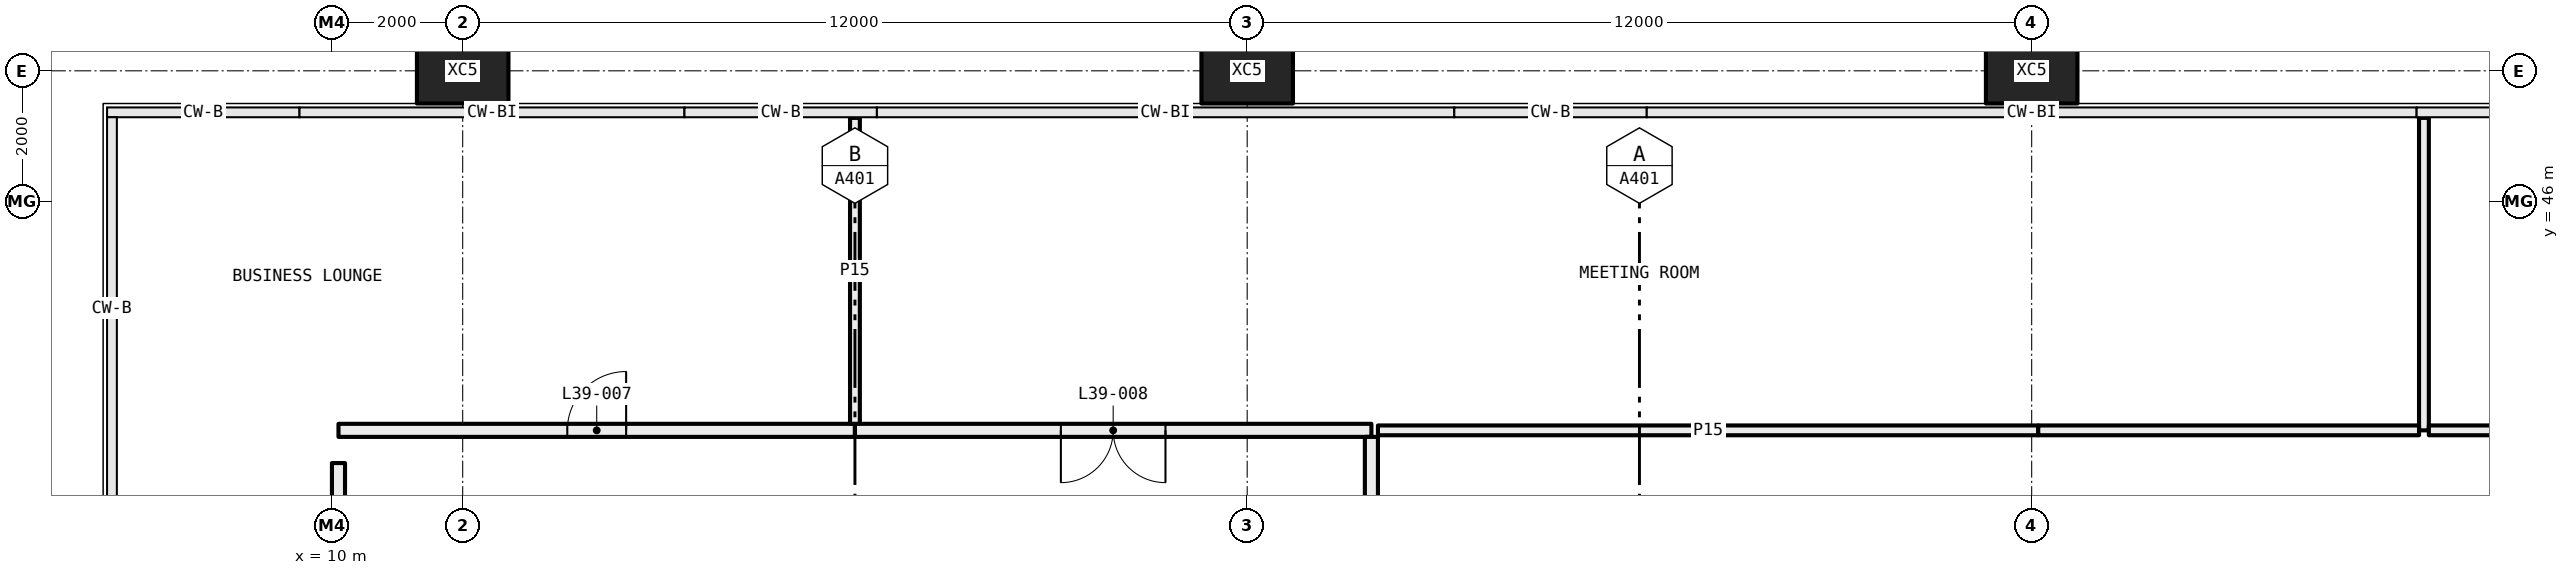
"""IFC4 building model, lengths in metres.
Left out: names, types, materials, properties, quantities, classifications, styles, units other than length and angle.
Written with IfcOpenShell. Run it as: python <this file> out.ifc"""

import sys

from ifc_helpers import new_model, si_unit, direction, frame, frame_2d, origin, origin_2d, place, context, subcontext, project, spatial, rectangle, hollow_rectangle, extrude, element, fill, save


model = new_model("IFC4")
c1 = context("Model", 3, precision=1e-05, world=origin(), true_north=direction((0.0, 1.0)))
c2 = subcontext(c1, "Body", "Model", "MODEL_VIEW")
j1 = project(units=[si_unit("LENGTHUNIT", "METRE"), si_unit("PLANEANGLEUNIT", "RADIAN")], contexts=[c1])
p1 = place(None, origin())
s1 = spatial("IfcSite", under=j1, at=p1, CompositionType="ELEMENT")
p2 = place(p1, origin())
s2 = spatial("IfcBuilding", under=s1, at=p2, CompositionType="ELEMENT")
p3 = place(p2, frame((0.0, 0.0, 148.35)))
s3 = spatial("IfcBuildingStorey", under=s2, at=p3, CompositionType="ELEMENT", Elevation=148.35)
for number, where, z_axis, x_axis in (
    (1, (12.0, 48.0, -0.4), (0.0, 0.0, 1.0), (1.0, 0.0, 0.0)),
    (2, (24.0, 48.0, -0.4), (0.0, 0.0, 1.0), (1.0, 0.0, 0.0)),
    (3, (36.0, 48.0, -0.4), (0.0, 0.0, 1.0), (1.0, 0.0, 0.0)),
):
    element("IfcColumn", number, at=place(p3, frame(where, z_axis=z_axis, x_axis=x_axis)), inside=s3, PredefinedType="COLUMN", context=c2, shape_type="SweptSolid", body=[
        extrude(hollow_rectangle(XDim=1.4, YDim=1.0, WallThickness=0.055, at=origin_2d()), origin(), (0.0, 0.0, 1.0), 5.4),
    ])
p4 = place(p3, frame((18.0, 42.5, 0.0), z_axis=(0.0, 0.0, 1.0), x_axis=(-1.0, 0.0, 0.0)))
e4 = element("IfcWall", 4, at=p4, inside=s3, PredefinedType="PARTITIONING", context=c2, shape_type="SweptSolid", body=[
    extrude(rectangle(XDim=7.9, YDim=0.2, at=frame_2d((3.95, 0.0))), origin(), (0.0, 0.0, 1.0), 5.0),
])
p5 = place(p4, frame((3.5, 0.0, 0.0)))
e5 = element("IfcOpeningElement", 5, at=p5, cuts=e4, PredefinedType="OPENING", context=c2, shape_type="SweptSolid", body=[
    extrude(rectangle(XDim=0.9, YDim=2.1, at=frame_2d((0.45, 1.05))), frame((0.0, 0.11, 0.0), z_axis=(0.0, -1.0, 0.0), x_axis=(1.0, 0.0, 0.0)), (0.0, 0.0, 1.0), 0.22),
])
p6 = place(p3, frame((25.9, 42.5, 0.0), z_axis=(0.0, 0.0, 1.0), x_axis=(-1.0, 0.0, 0.0)))
e6 = element("IfcWall", 6, at=p6, inside=s3, PredefinedType="PARTITIONING", context=c2, shape_type="SweptSolid", body=[
    extrude(rectangle(XDim=7.9, YDim=0.2, at=frame_2d((3.95, 0.0))), origin(), (0.0, 0.0, 1.0), 5.0),
])
p7 = place(p6, frame((3.15, 0.0, 0.0)))
e7 = element("IfcOpeningElement", 7, at=p7, cuts=e6, PredefinedType="OPENING", context=c2, shape_type="SweptSolid", body=[
    extrude(rectangle(XDim=1.6, YDim=2.1, at=frame_2d((0.8, 1.05))), frame((0.0, 0.11, 0.0), z_axis=(0.0, -1.0, 0.0), x_axis=(1.0, 0.0, 0.0)), (0.0, 0.0, 1.0), 0.22),
])
p8 = place(p3, frame((10.1, 42.0, 0.0), z_axis=(0.0, 0.0, 1.0), x_axis=(0.0, -1.0, 0.0)))
e8 = element("IfcWall", 8, at=p8, inside=s3, PredefinedType="PARTITIONING", context=c2, shape_type="SweptSolid", body=[
    extrude(rectangle(XDim=18.1, YDim=0.2, at=frame_2d((9.05, 0.0))), origin(), (0.0, 0.0, 1.0), 4.4),
])
p9 = place(p8, frame((8.25, 0.0, 0.0)))
e9 = element("IfcOpeningElement", 9, at=p9, cuts=e8, PredefinedType="OPENING", context=c2, shape_type="SweptSolid", body=[
    extrude(rectangle(XDim=1.6, YDim=2.1, at=frame_2d((0.8, 1.05))), frame((0.0, 0.11, 0.0), z_axis=(0.0, -1.0, 0.0), x_axis=(1.0, 0.0, 0.0)), (0.0, 0.0, 1.0), 0.22),
])
p10 = place(p3, frame((25.9, 36.1, 0.0), z_axis=(0.0, 0.0, 1.0), x_axis=(0.0, 1.0, 0.0)))
e10 = element("IfcWall", 10, at=p10, inside=s3, PredefinedType="PARTITIONING", context=c2, shape_type="SweptSolid", body=[
    extrude(rectangle(XDim=6.3, YDim=0.2, at=frame_2d((3.15, 0.0))), origin(), (0.0, 0.0, 1.0), 5.0),
])
p11 = place(p3, frame((18.0, 42.6, 0.0), z_axis=(0.0, 0.0, 1.0), x_axis=(0.0, 1.0, 0.0)))
e11 = element("IfcWall", 11, at=p11, inside=s3, PredefinedType="PARTITIONING", context=c2, shape_type="SweptSolid", body=[
    extrude(rectangle(XDim=4.68, YDim=0.15, at=frame_2d((2.34, 0.0))), origin(), (0.0, 0.0, 1.0), 5.0),
])
p12 = place(p3, frame((42.0, 42.5, 0.0), z_axis=(0.0, 0.0, 1.0), x_axis=(0.0, 1.0, 0.0)))
e12 = element("IfcWall", 12, at=p12, inside=s3, PredefinedType="PARTITIONING", context=c2, shape_type="SweptSolid", body=[
    extrude(rectangle(XDim=4.78, YDim=0.15, at=frame_2d((2.39, 0.0))), origin(), (0.0, 0.0, 1.0), 5.0),
])
p13 = place(p3, frame((26.0, 42.5, 0.0), z_axis=(0.0, 0.0, 1.0), x_axis=(1.0, 0.0, 0.0)))
e13 = element("IfcWall", 13, at=p13, inside=s3, PredefinedType="PARTITIONING", context=c2, shape_type="SweptSolid", body=[
    extrude(rectangle(XDim=10.1, YDim=0.15, at=frame_2d((5.05, 0.0))), origin(), (0.0, 0.0, 1.0), 4.4),
])
p14 = place(p3, frame((36.1, 42.5, 0.0), z_axis=(0.0, 0.0, 1.0), x_axis=(1.0, 0.0, 0.0)))
e14 = element("IfcWall", 14, at=p14, inside=s3, PredefinedType="PARTITIONING", context=c2, shape_type="SweptSolid", body=[
    extrude(rectangle(XDim=5.825, YDim=0.15, at=frame_2d((2.913, 0.0))), origin(), (0.0, 0.0, 1.0), 5.0),
])
p15 = place(p3, frame((42.075, 42.5, 0.0), z_axis=(0.0, 0.0, 1.0), x_axis=(1.0, 0.0, 0.0)))
e15 = element("IfcWall", 15, at=p15, inside=s3, PredefinedType="PARTITIONING", context=c2, shape_type="SweptSolid", body=[
    extrude(rectangle(XDim=3.925, YDim=0.15, at=frame_2d((1.962, 0.0))), origin(), (0.0, 0.0, 1.0), 5.0),
])
p16 = place(p5, frame((0.9, 0.0, 0.0), x_axis=(-1.0, 0.0, 0.0)))
e16 = element("IfcDoor", 16, at=p16, inside=s3, OperationType="SINGLE_SWING_LEFT", PredefinedType="DOOR", context=c2, shape_type="SweptSolid", body=[
    extrude(rectangle(XDim=0.9, YDim=2.1, at=frame_2d((0.45, 1.05))), frame((0.0, 0.025, 0.0), z_axis=(0.0, -1.0, 0.0), x_axis=(1.0, 0.0, 0.0)), (0.0, 0.0, 1.0), 0.05),
])
fill(e5, e16)
p17 = place(p7, origin())
e17 = element("IfcDoor", 17, at=p17, inside=s3, OperationType="DOUBLE_DOOR_SINGLE_SWING", PredefinedType="DOOR", context=c2, shape_type="SweptSolid", body=[
    extrude(rectangle(XDim=1.6, YDim=2.1, at=frame_2d((0.8, 1.05))), frame((0.0, 0.025, 0.0), z_axis=(0.0, -1.0, 0.0), x_axis=(1.0, 0.0, 0.0)), (0.0, 0.0, 1.0), 0.05),
])
fill(e7, e17)
save(model, sys.argv[1])
